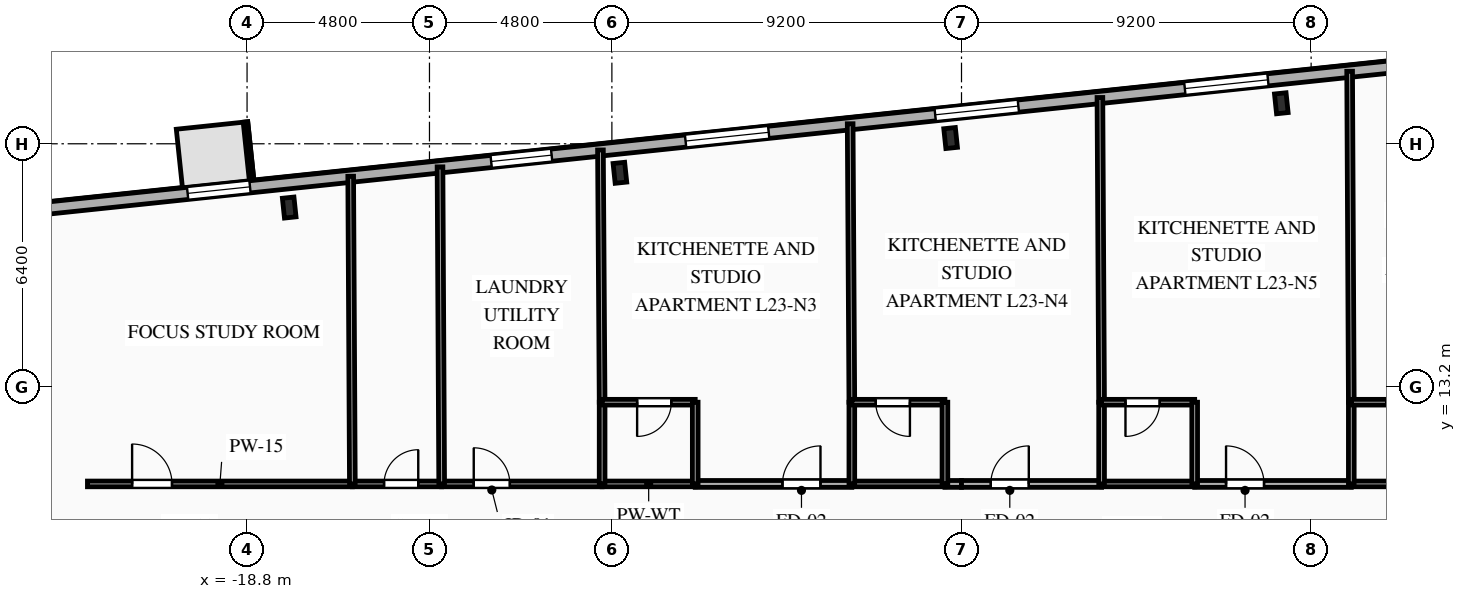
"""IFC4 building model, lengths in metres.
Left out: names, types, materials, properties, quantities, classifications, styles, units other than length and angle.
Written with IfcOpenShell. Run it as: python <this file> out.ifc"""

import sys

from ifc_helpers import new_model, si_unit, direction, frame, frame_2d, origin, origin_2d, place, context, subcontext, project, spatial, rectangle, i_section, extrude, element, fill, save


model = new_model("IFC4")
c1 = context("Model", 3, precision=1e-05, world=origin(), true_north=direction((0.0, 1.0)))
c2 = subcontext(c1, "Body", "Model", "MODEL_VIEW")
j1 = project(units=[si_unit("LENGTHUNIT", "METRE"), si_unit("PLANEANGLEUNIT", "RADIAN")], contexts=[c1])
p1 = place(None, origin())
s1 = spatial("IfcSite", under=j1, at=p1, CompositionType="ELEMENT")
p2 = place(p1, origin())
s2 = spatial("IfcBuilding", under=s1, at=p2, CompositionType="ELEMENT")
p3 = place(p2, frame((0.0, 0.0, 85.7)))
s3 = spatial("IfcBuildingStorey", under=s2, at=p3, CompositionType="ELEMENT", Elevation=85.7)
for number, where, z_axis, x_axis in (
    (1, (8.415, 20.666, 0.0), (0.0, 0.0, 1.0), (0.995, 0.105, 0.0)),
    (2, (-0.287, 19.751, 0.0), (0.0, 0.0, 1.0), (0.995, 0.105, 0.0)),
    (3, (-8.989, 18.836, 0.0), (0.0, 0.0, 1.0), (0.995, 0.105, 0.0)),
    (4, (-17.691, 17.922, 0.0), (0.0, 0.0, 1.0), (0.995, 0.105, 0.0)),
):
    element("IfcColumn", number, at=place(p3, frame(where, z_axis=z_axis, x_axis=x_axis)), inside=s3, PredefinedType="COLUMN", context=c2, shape_type="SweptSolid", body=[
        extrude(i_section(OverallWidth=0.306, OverallDepth=0.524, WebThickness=0.021, FlangeThickness=0.04, FilletRadius=0.027, at=origin_2d()), origin(), (0.0, 0.0, 1.0), 3.35),
    ])
p4 = place(p3, frame((-27.107, 17.586, 0.0), z_axis=(0.0, 0.0, 1.0), x_axis=(0.994521628355, 0.104531003701, 0.0)))
e5 = element("IfcWall", 5, at=p4, inside=s3, PredefinedType="SOLIDWALL", context=c2, shape_type="SweptSolid", body=[
    extrude(rectangle(XDim=53.8, YDim=0.32, at=frame_2d((26.9, 0.0))), origin(), (0.0, 0.0, 1.0), 3.045),
])
p5 = place(p4, frame((6.781, 0.0, 0.85)))
e6 = element("IfcOpeningElement", 6, at=p5, cuts=e5, PredefinedType="OPENING", context=c2, shape_type="SweptSolid", body=[
    extrude(rectangle(XDim=1.65, YDim=1.85, at=frame_2d((0.825, 0.925))), frame((0.0, 0.17, 0.0), z_axis=(0.0, -1.0, 0.0), x_axis=(1.0, 0.0, 0.0)), (0.0, 0.0, 1.0), 0.34),
])
p6 = place(p4, frame((14.812, 0.0, 0.85)))
e7 = element("IfcOpeningElement", 7, at=p6, cuts=e5, PredefinedType="OPENING", context=c2, shape_type="SweptSolid", body=[
    extrude(rectangle(XDim=1.6, YDim=1.85, at=frame_2d((0.8, 0.925))), frame((0.0, 0.17, 0.0), z_axis=(0.0, -1.0, 0.0), x_axis=(1.0, 0.0, 0.0)), (0.0, 0.0, 1.0), 0.34),
])
p7 = place(p4, frame((19.956, 0.0, 0.85)))
e8 = element("IfcOpeningElement", 8, at=p7, cuts=e5, PredefinedType="OPENING", context=c2, shape_type="SweptSolid", body=[
    extrude(rectangle(XDim=2.2, YDim=1.85, at=frame_2d((1.1, 0.925))), frame((0.0, 0.17, 0.0), z_axis=(0.0, -1.0, 0.0), x_axis=(1.0, 0.0, 0.0)), (0.0, 0.0, 1.0), 0.34),
])
p8 = place(p4, frame((26.561, 0.0, 0.85)))
e9 = element("IfcOpeningElement", 9, at=p8, cuts=e5, PredefinedType="OPENING", context=c2, shape_type="SweptSolid", body=[
    extrude(rectangle(XDim=2.2, YDim=1.85, at=frame_2d((1.1, 0.925))), frame((0.0, 0.17, 0.0), z_axis=(0.0, -1.0, 0.0), x_axis=(1.0, 0.0, 0.0)), (0.0, 0.0, 1.0), 0.34),
])
p9 = place(p4, frame((33.166, 0.0, 0.85)))
e10 = element("IfcOpeningElement", 10, at=p9, cuts=e5, PredefinedType="OPENING", context=c2, shape_type="SweptSolid", body=[
    extrude(rectangle(XDim=2.2, YDim=1.85, at=frame_2d((1.1, 0.925))), frame((0.0, 0.17, 0.0), z_axis=(0.0, -1.0, 0.0), x_axis=(1.0, 0.0, 0.0)), (0.0, 0.0, 1.0), 0.34),
])
p10 = place(p4, frame((39.771, 0.0, 0.85)))
e11 = element("IfcOpeningElement", 11, at=p10, cuts=e5, PredefinedType="OPENING", context=c2, shape_type="SweptSolid", body=[
    extrude(rectangle(XDim=2.2, YDim=1.85, at=frame_2d((1.1, 0.925))), frame((0.0, 0.17, 0.0), z_axis=(0.0, -1.0, 0.0), x_axis=(1.0, 0.0, 0.0)), (0.0, 0.0, 1.0), 0.34),
])
p11 = place(p4, frame((46.45, 0.0, 0.85)))
e12 = element("IfcOpeningElement", 12, at=p11, cuts=e5, PredefinedType="OPENING", context=c2, shape_type="SweptSolid", body=[
    extrude(rectangle(XDim=1.65, YDim=1.85, at=frame_2d((0.825, 0.925))), frame((0.0, 0.17, 0.0), z_axis=(0.0, -1.0, 0.0), x_axis=(1.0, 0.0, 0.0)), (0.0, 0.0, 1.0), 0.34),
])
p12 = place(p3, frame((-23.0, 10.65, 0.0), z_axis=(0.0, 0.0, 1.0), x_axis=(1.0, 0.0, 0.0)))
e13 = element("IfcWall", 13, at=p12, inside=s3, PredefinedType="PARTITIONING", context=c2, shape_type="SweptSolid", body=[
    extrude(rectangle(XDim=6.971, YDim=0.15, at=frame_2d((3.485, 0.0))), origin(), (0.0, 0.0, 1.0), 3.045),
])
p13 = place(p12, frame((1.175, 0.0, 0.0)))
e14 = element("IfcOpeningElement", 14, at=p13, cuts=e13, PredefinedType="OPENING", context=c2, shape_type="SweptSolid", body=[
    extrude(rectangle(XDim=1.05, YDim=2.15, at=frame_2d((0.525, 1.075))), frame((0.0, 0.085, 0.0), z_axis=(0.0, -1.0, 0.0), x_axis=(1.0, 0.0, 0.0)), (0.0, 0.0, 1.0), 0.17),
])
p14 = place(p3, frame((-16.029, 10.65, 0.0), z_axis=(0.0, 0.0, 1.0), x_axis=(1.0, 0.0, 0.0)))
e15 = element("IfcWall", 15, at=p14, inside=s3, PredefinedType="PLUMBINGWALL", context=c2, shape_type="SweptSolid", body=[
    extrude(rectangle(XDim=2.35, YDim=0.15, at=frame_2d((1.175, 0.0))), origin(), (0.0, 0.0, 1.0), 3.045),
])
p15 = place(p14, frame((0.834, 0.0, 0.0)))
e16 = element("IfcOpeningElement", 16, at=p15, cuts=e15, PredefinedType="OPENING", context=c2, shape_type="SweptSolid", body=[
    extrude(rectangle(XDim=0.9, YDim=2.1, at=frame_2d((0.45, 1.05))), frame((0.0, 0.085, 0.0), z_axis=(0.0, -1.0, 0.0), x_axis=(1.0, 0.0, 0.0)), (0.0, 0.0, 1.0), 0.17),
])
p16 = place(p3, frame((-13.679, 10.65, 0.0), z_axis=(0.0, 0.0, 1.0), x_axis=(1.0, 0.0, 0.0)))
e17 = element("IfcWall", 17, at=p16, inside=s3, PredefinedType="PARTITIONING", context=c2, shape_type="SweptSolid", body=[
    extrude(rectangle(XDim=4.222, YDim=0.15, at=frame_2d((2.111, 0.0))), origin(), (0.0, 0.0, 1.0), 3.045),
])
p17 = place(p16, frame((0.844, 0.0, 0.0)))
e18 = element("IfcOpeningElement", 18, at=p17, cuts=e17, PredefinedType="OPENING", context=c2, shape_type="SweptSolid", body=[
    extrude(rectangle(XDim=0.95, YDim=2.1, at=frame_2d((0.475, 1.05))), frame((0.0, 0.085, 0.0), z_axis=(0.0, -1.0, 0.0), x_axis=(1.0, 0.0, 0.0)), (0.0, 0.0, 1.0), 0.17),
])
p18 = place(p3, frame((-7.007, 10.65, 0.0), z_axis=(0.0, 0.0, 1.0), x_axis=(1.0, 0.0, 0.0)))
e19 = element("IfcWall", 19, at=p18, inside=s3, PredefinedType="PARTITIONING", context=c2, shape_type="SweptSolid", body=[
    extrude(rectangle(XDim=4.121, YDim=0.18, at=frame_2d((2.061, 0.0))), origin(), (0.0, 0.0, 1.0), 3.045),
])
p19 = place(p18, frame((2.296, 0.0, 0.0)))
e20 = element("IfcOpeningElement", 20, at=p19, cuts=e19, PredefinedType="OPENING", context=c2, shape_type="SweptSolid", body=[
    extrude(rectangle(XDim=1.0, YDim=2.15, at=frame_2d((0.5, 1.075))), frame((0.0, 0.1, 0.0), z_axis=(0.0, -1.0, 0.0), x_axis=(1.0, 0.0, 0.0)), (0.0, 0.0, 1.0), 0.2),
])
p20 = place(p3, frame((-9.457, 10.65, 0.0), z_axis=(0.0, 0.0, 1.0), x_axis=(1.0, 0.0, 0.0)))
e21 = element("IfcWall", 21, at=p20, inside=s3, PredefinedType="PLUMBINGWALL", context=c2, shape_type="SweptSolid", body=[
    extrude(rectangle(XDim=2.45, YDim=0.15, at=frame_2d((1.225, 0.0))), origin(), (0.0, 0.0, 1.0), 3.045),
])
p21 = place(p3, frame((-0.436, 10.65, 0.0), z_axis=(0.0, 0.0, 1.0), x_axis=(1.0, 0.0, 0.0)))
e22 = element("IfcWall", 22, at=p21, inside=s3, PredefinedType="PARTITIONING", context=c2, shape_type="SweptSolid", body=[
    extrude(rectangle(XDim=0.436, YDim=0.18, at=frame_2d((0.218, 0.0))), origin(), (0.0, 0.0, 1.0), 3.045),
])
p22 = place(p3, frame((-2.886, 10.65, 0.0), z_axis=(0.0, 0.0, 1.0), x_axis=(1.0, 0.0, 0.0)))
e23 = element("IfcWall", 23, at=p22, inside=s3, PredefinedType="PLUMBINGWALL", context=c2, shape_type="SweptSolid", body=[
    extrude(rectangle(XDim=2.45, YDim=0.15, at=frame_2d((1.225, 0.0))), origin(), (0.0, 0.0, 1.0), 3.045),
])
p23 = place(p3, frame((0.0, 10.65, 0.0), z_axis=(0.0, 0.0, 1.0), x_axis=(1.0, 0.0, 0.0)))
e24 = element("IfcWall", 24, at=p23, inside=s3, PredefinedType="PARTITIONING", context=c2, shape_type="SweptSolid", body=[
    extrude(rectangle(XDim=3.686, YDim=0.18, at=frame_2d((1.843, 0.0))), origin(), (0.0, 0.0, 1.0), 3.045),
])
p24 = place(p23, frame((0.771, 0.0, 0.0)))
e25 = element("IfcOpeningElement", 25, at=p24, cuts=e24, PredefinedType="OPENING", context=c2, shape_type="SweptSolid", body=[
    extrude(rectangle(XDim=1.0, YDim=2.15, at=frame_2d((0.5, 1.075))), frame((0.0, 0.1, 0.0), z_axis=(0.0, -1.0, 0.0), x_axis=(1.0, 0.0, 0.0)), (0.0, 0.0, 1.0), 0.2),
])
p25 = place(p3, frame((6.136, 10.65, 0.0), z_axis=(0.0, 0.0, 1.0), x_axis=(1.0, 0.0, 0.0)))
e26 = element("IfcWall", 26, at=p25, inside=s3, PredefinedType="PARTITIONING", context=c2, shape_type="SweptSolid", body=[
    extrude(rectangle(XDim=4.121, YDim=0.18, at=frame_2d((2.061, 0.0))), origin(), (0.0, 0.0, 1.0), 3.045),
])
p26 = place(p25, frame((0.825, 0.0, 0.0)))
e27 = element("IfcOpeningElement", 27, at=p26, cuts=e26, PredefinedType="OPENING", context=c2, shape_type="SweptSolid", body=[
    extrude(rectangle(XDim=1.0, YDim=2.15, at=frame_2d((0.5, 1.075))), frame((0.0, 0.1, 0.0), z_axis=(0.0, -1.0, 0.0), x_axis=(1.0, 0.0, 0.0)), (0.0, 0.0, 1.0), 0.2),
])
for number, where, z_axis, x_axis in (
    (28, (3.686, 10.65, 0.0), (0.0, 0.0, 1.0), (1.0, 0.0, 0.0)),
    (29, (10.257, 10.65, 0.0), (0.0, 0.0, 1.0), (1.0, 0.0, 0.0)),
):
    element("IfcWall", number, at=place(p3, frame(where, z_axis=z_axis, x_axis=x_axis)), inside=s3, PredefinedType="PLUMBINGWALL", context=c2, shape_type="SweptSolid", body=[
        extrude(rectangle(XDim=2.45, YDim=0.15, at=frame_2d((1.225, 0.0))), origin(), (0.0, 0.0, 1.0), 3.045),
    ])
p27 = place(p3, frame((-16.073, 18.746, 0.0), z_axis=(0.0, 0.0, 1.0), x_axis=(0.005428146808, -0.999985267503, 0.0)))
e30 = element("IfcWall", 30, at=p27, inside=s3, PredefinedType="PLUMBINGWALL", context=c2, shape_type="SweptSolid", body=[
    extrude(rectangle(XDim=8.096, YDim=0.15, at=frame_2d((4.048, 0.0))), origin(), (0.0, 0.0, 1.0), 3.045),
])
p28 = place(p3, frame((-13.723, 18.992, 0.0), z_axis=(0.0, 0.0, 1.0), x_axis=(0.005267551513, -0.999986126354, 0.0)))
e31 = element("IfcWall", 31, at=p28, inside=s3, PredefinedType="PLUMBINGWALL", context=c2, shape_type="SweptSolid", body=[
    extrude(rectangle(XDim=8.343, YDim=0.15, at=frame_2d((4.171, 0.0))), origin(), (0.0, 0.0, 1.0), 3.045),
])
p29 = place(p3, frame((-9.501, 19.436, 0.0), z_axis=(0.0, 0.0, 1.0), x_axis=(0.006621884097, -0.999978075085, 0.0)))
e32 = element("IfcWall", 32, at=p29, inside=s3, PredefinedType="PARTITIONING", context=c2, shape_type="SweptSolid", body=[
    extrude(rectangle(XDim=6.636, YDim=0.15, at=frame_2d((3.318, 0.0))), origin(), (0.0, 0.0, 1.0), 3.045),
])
p30 = place(p3, frame((-9.457, 12.8, 0.0), z_axis=(0.0, 0.0, 1.0), x_axis=(0.0, -1.0, 0.0)))
e33 = element("IfcWall", 33, at=p30, inside=s3, PredefinedType="PLUMBINGWALL", context=c2, shape_type="SweptSolid", body=[
    extrude(rectangle(XDim=2.15, YDim=0.15, at=frame_2d((1.075, 0.0))), origin(), (0.0, 0.0, 1.0), 3.045),
])
p31 = place(p3, frame((-7.007, 12.8, 0.0), z_axis=(0.0, 0.0, 1.0), x_axis=(-1.0, 0.0, 0.0)))
e34 = element("IfcWall", 34, at=p31, inside=s3, PredefinedType="PLUMBINGWALL", context=c2, shape_type="SweptSolid", body=[
    extrude(rectangle(XDim=2.45, YDim=0.15, at=frame_2d((1.225, 0.0))), origin(), (0.0, 0.0, 1.0), 3.045),
])
p32 = place(p31, frame((0.629, 0.0, 0.0)))
e35 = element("IfcOpeningElement", 35, at=p32, cuts=e34, PredefinedType="OPENING", context=c2, shape_type="SweptSolid", body=[
    extrude(rectangle(XDim=0.9, YDim=2.1, at=frame_2d((0.45, 1.05))), frame((0.0, 0.085, 0.0), z_axis=(0.0, -1.0, 0.0), x_axis=(1.0, 0.0, 0.0)), (0.0, 0.0, 1.0), 0.17),
])
p33 = place(p3, frame((-7.007, 10.65, 0.0), z_axis=(0.0, 0.0, 1.0), x_axis=(0.0, 1.0, 0.0)))
e36 = element("IfcWall", 36, at=p33, inside=s3, PredefinedType="PLUMBINGWALL", context=c2, shape_type="SweptSolid", body=[
    extrude(rectangle(XDim=2.15, YDim=0.15, at=frame_2d((1.075, 0.0))), origin(), (0.0, 0.0, 1.0), 3.045),
])
p34 = place(p3, frame((-2.93, 20.127, 0.0), z_axis=(0.0, 0.0, 1.0), x_axis=(0.005997692928, -0.999982013678, 0.0)))
e37 = element("IfcWall", 37, at=p34, inside=s3, PredefinedType="PARTITIONING", context=c2, shape_type="SweptSolid", body=[
    extrude(rectangle(XDim=7.327, YDim=0.15, at=frame_2d((3.664, 0.0))), origin(), (0.0, 0.0, 1.0), 3.045),
])
p35 = place(p3, frame((-2.886, 12.8, 0.0), z_axis=(0.0, 0.0, 1.0), x_axis=(0.0, -1.0, 0.0)))
e38 = element("IfcWall", 38, at=p35, inside=s3, PredefinedType="PLUMBINGWALL", context=c2, shape_type="SweptSolid", body=[
    extrude(rectangle(XDim=2.15, YDim=0.15, at=frame_2d((1.075, 0.0))), origin(), (0.0, 0.0, 1.0), 3.045),
])
p36 = place(p3, frame((-0.436, 12.8, 0.0), z_axis=(0.0, 0.0, 1.0), x_axis=(-1.0, 0.0, 0.0)))
e39 = element("IfcWall", 39, at=p36, inside=s3, PredefinedType="PLUMBINGWALL", context=c2, shape_type="SweptSolid", body=[
    extrude(rectangle(XDim=2.45, YDim=0.15, at=frame_2d((1.225, 0.0))), origin(), (0.0, 0.0, 1.0), 3.045),
])
p37 = place(p36, frame((0.921, 0.0, 0.0)))
e40 = element("IfcOpeningElement", 40, at=p37, cuts=e39, PredefinedType="OPENING", context=c2, shape_type="SweptSolid", body=[
    extrude(rectangle(XDim=0.9, YDim=2.1, at=frame_2d((0.45, 1.05))), frame((0.0, 0.085, 0.0), z_axis=(0.0, -1.0, 0.0), x_axis=(1.0, 0.0, 0.0)), (0.0, 0.0, 1.0), 0.17),
])
p38 = place(p3, frame((-0.436, 10.65, 0.0), z_axis=(0.0, 0.0, 1.0), x_axis=(0.0, 1.0, 0.0)))
e41 = element("IfcWall", 41, at=p38, inside=s3, PredefinedType="PLUMBINGWALL", context=c2, shape_type="SweptSolid", body=[
    extrude(rectangle(XDim=2.15, YDim=0.15, at=frame_2d((1.075, 0.0))), origin(), (0.0, 0.0, 1.0), 3.045),
])
p39 = place(p3, frame((3.642, 20.818, 0.0), z_axis=(0.0, 0.0, 1.0), x_axis=(0.005481038253, -0.999984978997, 0.0)))
e42 = element("IfcWall", 42, at=p39, inside=s3, PredefinedType="PARTITIONING", context=c2, shape_type="SweptSolid", body=[
    extrude(rectangle(XDim=8.018, YDim=0.15, at=frame_2d((4.009, 0.0))), origin(), (0.0, 0.0, 1.0), 3.045),
])
p40 = place(p3, frame((3.686, 12.8, 0.0), z_axis=(0.0, 0.0, 1.0), x_axis=(0.0, -1.0, 0.0)))
e43 = element("IfcWall", 43, at=p40, inside=s3, PredefinedType="PLUMBINGWALL", context=c2, shape_type="SweptSolid", body=[
    extrude(rectangle(XDim=2.15, YDim=0.15, at=frame_2d((1.075, 0.0))), origin(), (0.0, 0.0, 1.0), 3.045),
])
p41 = place(p3, frame((6.136, 12.8, 0.0), z_axis=(0.0, 0.0, 1.0), x_axis=(-1.0, 0.0, 0.0)))
e44 = element("IfcWall", 44, at=p41, inside=s3, PredefinedType="PLUMBINGWALL", context=c2, shape_type="SweptSolid", body=[
    extrude(rectangle(XDim=2.45, YDim=0.15, at=frame_2d((1.225, 0.0))), origin(), (0.0, 0.0, 1.0), 3.045),
])
p42 = place(p41, frame((0.921, 0.0, 0.0)))
e45 = element("IfcOpeningElement", 45, at=p42, cuts=e44, PredefinedType="OPENING", context=c2, shape_type="SweptSolid", body=[
    extrude(rectangle(XDim=0.9, YDim=2.1, at=frame_2d((0.45, 1.05))), frame((0.0, 0.085, 0.0), z_axis=(0.0, -1.0, 0.0), x_axis=(1.0, 0.0, 0.0)), (0.0, 0.0, 1.0), 0.17),
])
p43 = place(p3, frame((6.136, 10.65, 0.0), z_axis=(0.0, 0.0, 1.0), x_axis=(0.0, 1.0, 0.0)))
e46 = element("IfcWall", 46, at=p43, inside=s3, PredefinedType="PLUMBINGWALL", context=c2, shape_type="SweptSolid", body=[
    extrude(rectangle(XDim=2.15, YDim=0.15, at=frame_2d((1.075, 0.0))), origin(), (0.0, 0.0, 1.0), 3.045),
])
p44 = place(p3, frame((10.213, 21.508, 0.0), z_axis=(0.0, 0.0, 1.0), x_axis=(0.005046334579, -0.999987267173, 0.0)))
e47 = element("IfcWall", 47, at=p44, inside=s3, PredefinedType="PARTITIONING", context=c2, shape_type="SweptSolid", body=[
    extrude(rectangle(XDim=8.708, YDim=0.15, at=frame_2d((4.354, 0.0))), origin(), (0.0, 0.0, 1.0), 3.045),
])
p45 = place(p3, frame((10.257, 12.8, 0.0), z_axis=(0.0, 0.0, 1.0), x_axis=(0.0, -1.0, 0.0)))
e48 = element("IfcWall", 48, at=p45, inside=s3, PredefinedType="PLUMBINGWALL", context=c2, shape_type="SweptSolid", body=[
    extrude(rectangle(XDim=2.15, YDim=0.15, at=frame_2d((1.075, 0.0))), origin(), (0.0, 0.0, 1.0), 3.045),
])
p46 = place(p3, frame((12.707, 12.8, 0.0), z_axis=(0.0, 0.0, 1.0), x_axis=(-1.0, 0.0, 0.0)))
e49 = element("IfcWall", 49, at=p46, inside=s3, PredefinedType="PLUMBINGWALL", context=c2, shape_type="SweptSolid", body=[
    extrude(rectangle(XDim=2.45, YDim=0.15, at=frame_2d((1.225, 0.0))), origin(), (0.0, 0.0, 1.0), 3.045),
])
p47 = place(p46, frame((0.629, 0.0, 0.0)))
e50 = element("IfcOpeningElement", 50, at=p47, cuts=e49, PredefinedType="OPENING", context=c2, shape_type="SweptSolid", body=[
    extrude(rectangle(XDim=0.9, YDim=2.1, at=frame_2d((0.45, 1.05))), frame((0.0, 0.085, 0.0), z_axis=(0.0, -1.0, 0.0), x_axis=(1.0, 0.0, 0.0)), (0.0, 0.0, 1.0), 0.17),
])
p48 = place(p5, origin())
e51 = element("IfcWindow", 51, at=p48, inside=s3, PartitioningType="SINGLE_PANEL", PredefinedType="WINDOW", context=c2, shape_type="SweptSolid", body=[
    extrude(rectangle(XDim=1.65, YDim=1.85, at=frame_2d((0.825, 0.925))), frame((0.0, 0.03, 0.0), z_axis=(0.0, -1.0, 0.0), x_axis=(1.0, 0.0, 0.0)), (0.0, 0.0, 1.0), 0.06),
])
fill(e6, e51)
p49 = place(p6, origin())
e52 = element("IfcWindow", 52, at=p49, inside=s3, PartitioningType="SINGLE_PANEL", PredefinedType="WINDOW", context=c2, shape_type="SweptSolid", body=[
    extrude(rectangle(XDim=1.6, YDim=1.85, at=frame_2d((0.8, 0.925))), frame((0.0, 0.03, 0.0), z_axis=(0.0, -1.0, 0.0), x_axis=(1.0, 0.0, 0.0)), (0.0, 0.0, 1.0), 0.06),
])
fill(e7, e52)
p50 = place(p7, origin())
e53 = element("IfcWindow", 53, at=p50, inside=s3, PartitioningType="SINGLE_PANEL", PredefinedType="WINDOW", context=c2, shape_type="SweptSolid", body=[
    extrude(rectangle(XDim=2.2, YDim=1.85, at=frame_2d((1.1, 0.925))), frame((0.0, 0.03, 0.0), z_axis=(0.0, -1.0, 0.0), x_axis=(1.0, 0.0, 0.0)), (0.0, 0.0, 1.0), 0.06),
])
fill(e8, e53)
p51 = place(p8, origin())
e54 = element("IfcWindow", 54, at=p51, inside=s3, PartitioningType="SINGLE_PANEL", PredefinedType="WINDOW", context=c2, shape_type="SweptSolid", body=[
    extrude(rectangle(XDim=2.2, YDim=1.85, at=frame_2d((1.1, 0.925))), frame((0.0, 0.03, 0.0), z_axis=(0.0, -1.0, 0.0), x_axis=(1.0, 0.0, 0.0)), (0.0, 0.0, 1.0), 0.06),
])
fill(e9, e54)
p52 = place(p9, origin())
e55 = element("IfcWindow", 55, at=p52, inside=s3, PartitioningType="SINGLE_PANEL", PredefinedType="WINDOW", context=c2, shape_type="SweptSolid", body=[
    extrude(rectangle(XDim=2.2, YDim=1.85, at=frame_2d((1.1, 0.925))), frame((0.0, 0.03, 0.0), z_axis=(0.0, -1.0, 0.0), x_axis=(1.0, 0.0, 0.0)), (0.0, 0.0, 1.0), 0.06),
])
fill(e10, e55)
p53 = place(p13, origin())
e56 = element("IfcDoor", 56, at=p53, inside=s3, OperationType="SINGLE_SWING_LEFT", PredefinedType="DOOR", context=c2, shape_type="SweptSolid", body=[
    extrude(rectangle(XDim=1.05, YDim=2.15, at=frame_2d((0.525, 1.075))), frame((0.0, 0.025, 0.0), z_axis=(0.0, -1.0, 0.0), x_axis=(1.0, 0.0, 0.0)), (0.0, 0.0, 1.0), 0.05),
])
fill(e14, e56)
p54 = place(p15, origin())
e57 = element("IfcDoor", 57, at=p54, inside=s3, OperationType="SINGLE_SWING_RIGHT", PredefinedType="DOOR", context=c2, shape_type="SweptSolid", body=[
    extrude(rectangle(XDim=0.9, YDim=2.1, at=frame_2d((0.45, 1.05))), frame((0.0, 0.025, 0.0), z_axis=(0.0, -1.0, 0.0), x_axis=(1.0, 0.0, 0.0)), (0.0, 0.0, 1.0), 0.05),
])
fill(e16, e57)
p55 = place(p17, origin())
e58 = element("IfcDoor", 58, at=p55, inside=s3, OperationType="SINGLE_SWING_LEFT", PredefinedType="DOOR", context=c2, shape_type="SweptSolid", body=[
    extrude(rectangle(XDim=0.95, YDim=2.1, at=frame_2d((0.475, 1.05))), frame((0.0, 0.025, 0.0), z_axis=(0.0, -1.0, 0.0), x_axis=(1.0, 0.0, 0.0)), (0.0, 0.0, 1.0), 0.05),
])
fill(e18, e58)
p56 = place(p19, origin())
e59 = element("IfcDoor", 59, at=p56, inside=s3, OperationType="SINGLE_SWING_RIGHT", PredefinedType="DOOR", context=c2, shape_type="SweptSolid", body=[
    extrude(rectangle(XDim=1.0, YDim=2.15, at=frame_2d((0.5, 1.075))), frame((0.0, 0.025, 0.0), z_axis=(0.0, -1.0, 0.0), x_axis=(1.0, 0.0, 0.0)), (0.0, 0.0, 1.0), 0.05),
])
fill(e20, e59)
p57 = place(p24, origin())
e60 = element("IfcDoor", 60, at=p57, inside=s3, OperationType="SINGLE_SWING_RIGHT", PredefinedType="DOOR", context=c2, shape_type="SweptSolid", body=[
    extrude(rectangle(XDim=1.0, YDim=2.15, at=frame_2d((0.5, 1.075))), frame((0.0, 0.025, 0.0), z_axis=(0.0, -1.0, 0.0), x_axis=(1.0, 0.0, 0.0)), (0.0, 0.0, 1.0), 0.05),
])
fill(e25, e60)
p58 = place(p26, origin())
e61 = element("IfcDoor", 61, at=p58, inside=s3, OperationType="SINGLE_SWING_LEFT", PredefinedType="DOOR", context=c2, shape_type="SweptSolid", body=[
    extrude(rectangle(XDim=1.0, YDim=2.15, at=frame_2d((0.5, 1.075))), frame((0.0, 0.025, 0.0), z_axis=(0.0, -1.0, 0.0), x_axis=(1.0, 0.0, 0.0)), (0.0, 0.0, 1.0), 0.05),
])
fill(e27, e61)
p59 = place(p32, origin())
e62 = element("IfcDoor", 62, at=p59, inside=s3, OperationType="SINGLE_SWING_RIGHT", PredefinedType="DOOR", context=c2, shape_type="SweptSolid", body=[
    extrude(rectangle(XDim=0.9, YDim=2.1, at=frame_2d((0.45, 1.05))), frame((0.0, 0.025, 0.0), z_axis=(0.0, -1.0, 0.0), x_axis=(1.0, 0.0, 0.0)), (0.0, 0.0, 1.0), 0.05),
])
fill(e35, e62)
p60 = place(p37, origin())
e63 = element("IfcDoor", 63, at=p60, inside=s3, OperationType="SINGLE_SWING_LEFT", PredefinedType="DOOR", context=c2, shape_type="SweptSolid", body=[
    extrude(rectangle(XDim=0.9, YDim=2.1, at=frame_2d((0.45, 1.05))), frame((0.0, 0.025, 0.0), z_axis=(0.0, -1.0, 0.0), x_axis=(1.0, 0.0, 0.0)), (0.0, 0.0, 1.0), 0.05),
])
fill(e40, e63)
p61 = place(p42, origin())
e64 = element("IfcDoor", 64, at=p61, inside=s3, OperationType="SINGLE_SWING_RIGHT", PredefinedType="DOOR", context=c2, shape_type="SweptSolid", body=[
    extrude(rectangle(XDim=0.9, YDim=2.1, at=frame_2d((0.45, 1.05))), frame((0.0, 0.025, 0.0), z_axis=(0.0, -1.0, 0.0), x_axis=(1.0, 0.0, 0.0)), (0.0, 0.0, 1.0), 0.05),
])
fill(e45, e64)
p62 = place(p47, origin())
e65 = element("IfcDoor", 65, at=p62, inside=s3, OperationType="SINGLE_SWING_LEFT", PredefinedType="DOOR", context=c2, shape_type="SweptSolid", body=[
    extrude(rectangle(XDim=0.9, YDim=2.1, at=frame_2d((0.45, 1.05))), frame((0.0, 0.025, 0.0), z_axis=(0.0, -1.0, 0.0), x_axis=(1.0, 0.0, 0.0)), (0.0, 0.0, 1.0), 0.05),
])
fill(e50, e65)
save(model, sys.argv[1])
